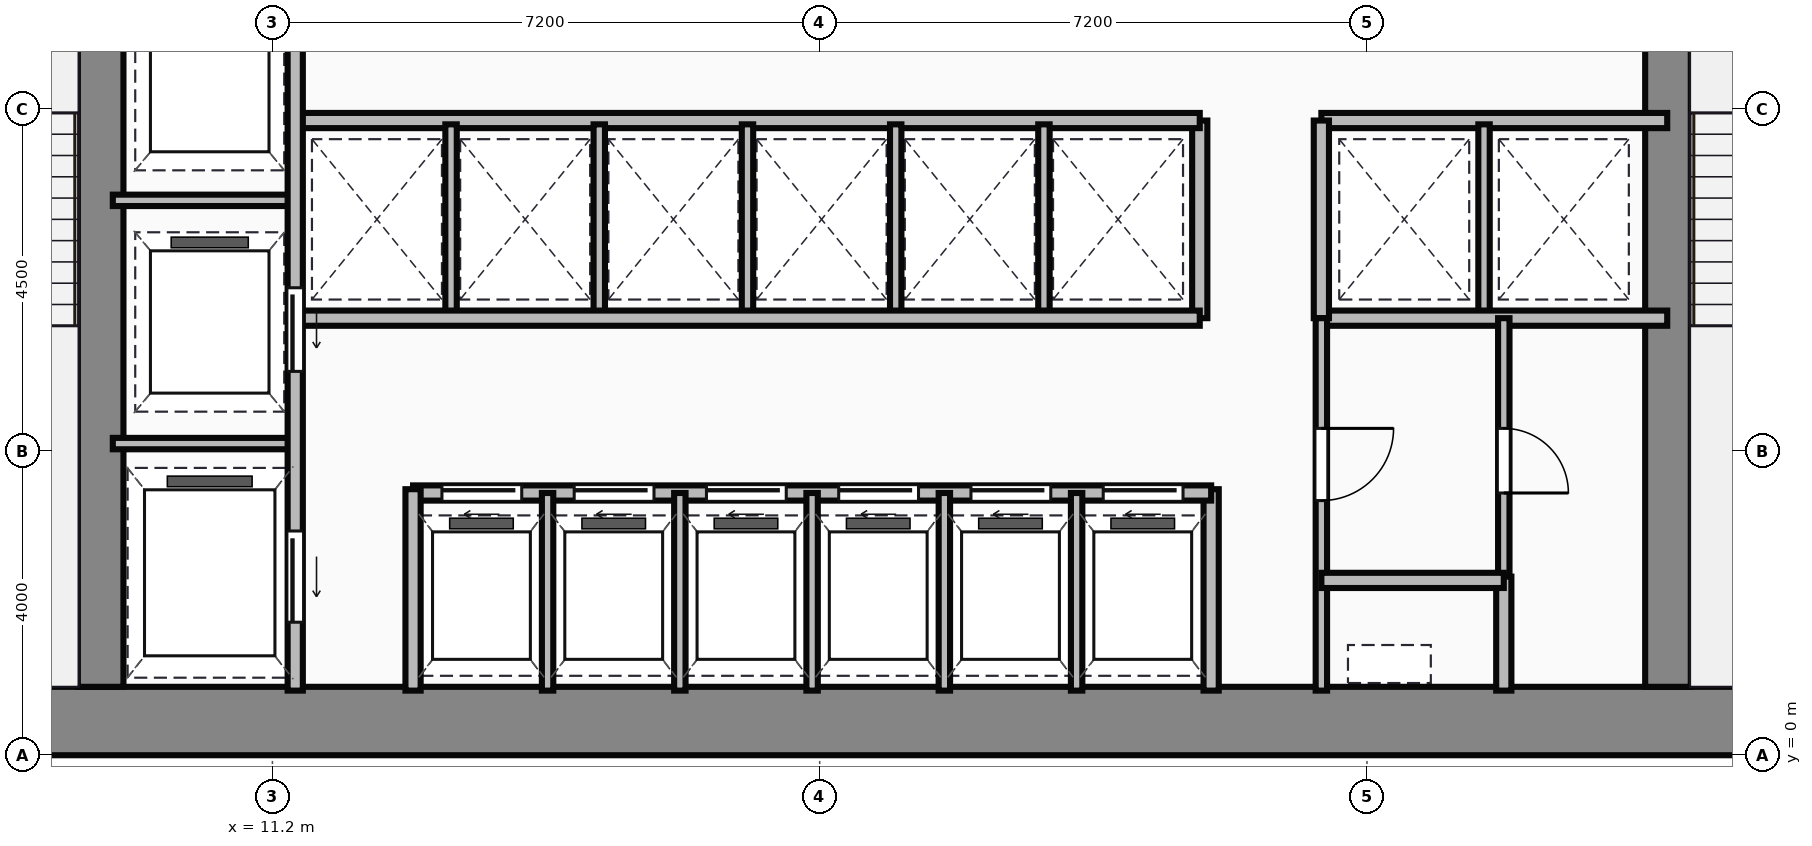
"""IFC4 building model, lengths in metres.
Left out: names, types, materials, properties, quantities, classifications, styles, units other than length and angle.
Written with IfcOpenShell. Run it as: python <this file> out.ifc"""

import sys

from ifc_helpers import new_model, si_unit, direction, frame, frame_2d, origin, place, context, subcontext, project, spatial, rectangle, extrude, source, transform, mapped, element, fill, save


model = new_model("IFC4")
c1 = context("Model", 3, precision=1e-05, world=origin(), true_north=direction((0.0, 1.0)))
c2 = subcontext(c1, "Body", "Model", "MODEL_VIEW")
j1 = project(units=[si_unit("LENGTHUNIT", "METRE"), si_unit("PLANEANGLEUNIT", "RADIAN")], contexts=[c1])
p1 = place(None, origin())
s1 = spatial("IfcSite", under=j1, at=p1, CompositionType="ELEMENT")
p2 = place(p1, origin())
s2 = spatial("IfcBuilding", under=s1, at=p2, CompositionType="ELEMENT")
p3 = place(p2, frame((0.0, 0.0, 65.35)))
s3 = spatial("IfcBuildingStorey", under=s2, at=p3, CompositionType="ELEMENT", Elevation=65.35)
m1 = source(origin(), c2, "Body", "SweptSolid", [
    extrude(rectangle(XDim=29.5, YDim=0.9, at=frame_2d((14.75, 0.0))), origin(), (0.0, 0.0, 1.0), 3.65),
])
p4 = place(p3, frame((4.5, 0.45, 0.0), z_axis=(0.0, 0.0, 1.0), x_axis=(1.0, 0.0, 0.0)))
e1 = element("IfcWall", 1, at=p4, inside=s3, PredefinedType="SHEAR", context=c2, shape_type="MappedRepresentation", body=[
    mapped(m1, transform((0.0, 0.0, 0.0))),
])
m2 = source(origin(), c2, "Body", "SweptSolid", [
    extrude(rectangle(XDim=12.2, YDim=0.6, at=frame_2d((6.1, 0.0))), origin(), (0.0, 0.0, 1.0), 3.65),
])
for number, where, z_axis, x_axis in (
    (2, (8.94, 0.9, 0.0), (0.0, 0.0, 1.0), (0.0, 1.0, 0.0)),
    (3, (29.56, 0.9, 0.0), (0.0, 0.0, 1.0), (0.0, 1.0, 0.0)),
):
    element("IfcWall", number, at=place(p3, frame(where, z_axis=z_axis, x_axis=x_axis)), inside=s3, PredefinedType="SHEAR", context=c2, shape_type="MappedRepresentation", body=[
        mapped(m2, transform((0.0, 0.0, 0.0))),
    ])
m3 = source(origin(), c2, "Body", "SweptSolid", [
    extrude(rectangle(XDim=9.6, YDim=0.2, at=frame_2d((4.8, 0.0))), origin(), (0.0, 0.0, 1.0), 3.4),
])
p5 = place(p3, frame((11.5, 0.85, 0.0), z_axis=(0.0, 0.0, 1.0), x_axis=(0.0, 1.0, 0.0)))
e4 = element("IfcWall", 4, at=p5, inside=s3, PredefinedType="PARTITIONING", context=c2, shape_type="MappedRepresentation", body=[
    mapped(m3, transform((0.0, 0.0, 0.0))),
])
p6 = place(p5, frame((4.2, 0.0, 0.0)))
e5 = element("IfcOpeningElement", 5, at=p6, cuts=e4, PredefinedType="OPENING", context=c2, shape_type="SweptSolid", body=[
    extrude(rectangle(XDim=1.1, YDim=2.15, at=frame_2d((0.55, 1.075))), frame((0.0, 0.11, 0.0), z_axis=(0.0, -1.0, 0.0), x_axis=(1.0, 0.0, 0.0)), (0.0, 0.0, 1.0), 0.22),
])
p7 = place(p5, frame((0.9, 0.0, 0.0)))
e6 = element("IfcOpeningElement", 6, at=p7, cuts=e4, PredefinedType="OPENING", context=c2, shape_type="SweptSolid", body=[
    extrude(rectangle(XDim=1.2, YDim=2.15, at=frame_2d((0.6, 1.075))), frame((0.0, 0.11, 0.0), z_axis=(0.0, -1.0, 0.0), x_axis=(1.0, 0.0, 0.0)), (0.0, 0.0, 1.0), 0.22),
])
m4 = source(origin(), c2, "Body", "SweptSolid", [
    extrude(rectangle(XDim=2.4, YDim=0.15, at=frame_2d((1.2, 0.0))), origin(), (0.0, 0.0, 1.0), 3.4),
])
for number, where, z_axis, x_axis in (
    (7, (9.1, 4.1, 0.0), (0.0, 0.0, 1.0), (1.0, 0.0, 0.0)),
    (8, (9.1, 7.3, 0.0), (0.0, 0.0, 1.0), (1.0, 0.0, 0.0)),
):
    element("IfcWall", number, at=place(p3, frame(where, z_axis=z_axis, x_axis=x_axis)), inside=s3, PredefinedType="PARTITIONING", context=c2, shape_type="MappedRepresentation", body=[
        mapped(m4, transform((0.0, 0.0, 0.0))),
    ])
m5 = source(origin(), c2, "Body", "SweptSolid", [
    extrude(rectangle(XDim=2.65, YDim=0.2, at=frame_2d((1.325, 0.0))), origin(), (0.0, 0.0, 1.0), 3.4),
])
p8 = place(p3, frame((13.05, 0.85, 0.0), z_axis=(0.0, 0.0, 1.0), x_axis=(0.0, 1.0, 0.0)))
e9 = element("IfcWall", 9, at=p8, inside=s3, PredefinedType="PARTITIONING", context=c2, shape_type="MappedRepresentation", body=[
    mapped(m5, transform((0.0, 0.0, 0.0))),
])
m6 = source(origin(), c2, "Body", "SweptSolid", [
    extrude(rectangle(XDim=10.5, YDim=0.2, at=frame_2d((5.25, 0.0))), origin(), (0.0, 0.0, 1.0), 3.4),
])
p9 = place(p3, frame((13.05, 3.45, 0.0), z_axis=(0.0, 0.0, 1.0), x_axis=(1.0, 0.0, 0.0)))
e10 = element("IfcWall", 10, at=p9, inside=s3, PredefinedType="PARTITIONING", context=c2, shape_type="MappedRepresentation", body=[
    mapped(m6, transform((0.0, 0.0, 0.0))),
])
p10 = place(p9, frame((0.38, 0.0, 0.0)))
e11 = element("IfcOpeningElement", 11, at=p10, cuts=e10, PredefinedType="OPENING", context=c2, shape_type="SweptSolid", body=[
    extrude(rectangle(XDim=1.05, YDim=2.15, at=frame_2d((0.525, 1.075))), frame((0.0, 0.11, 0.0), z_axis=(0.0, -1.0, 0.0), x_axis=(1.0, 0.0, 0.0)), (0.0, 0.0, 1.0), 0.22),
])
p11 = place(p9, frame((2.12, 0.0, 0.0)))
e12 = element("IfcOpeningElement", 12, at=p11, cuts=e10, PredefinedType="OPENING", context=c2, shape_type="SweptSolid", body=[
    extrude(rectangle(XDim=1.05, YDim=2.15, at=frame_2d((0.525, 1.075))), frame((0.0, 0.11, 0.0), z_axis=(0.0, -1.0, 0.0), x_axis=(1.0, 0.0, 0.0)), (0.0, 0.0, 1.0), 0.22),
])
p12 = place(p9, frame((3.86, 0.0, 0.0)))
e13 = element("IfcOpeningElement", 13, at=p12, cuts=e10, PredefinedType="OPENING", context=c2, shape_type="SweptSolid", body=[
    extrude(rectangle(XDim=1.05, YDim=2.15, at=frame_2d((0.525, 1.075))), frame((0.0, 0.11, 0.0), z_axis=(0.0, -1.0, 0.0), x_axis=(1.0, 0.0, 0.0)), (0.0, 0.0, 1.0), 0.22),
])
p13 = place(p9, frame((5.6, 0.0, 0.0)))
e14 = element("IfcOpeningElement", 14, at=p13, cuts=e10, PredefinedType="OPENING", context=c2, shape_type="SweptSolid", body=[
    extrude(rectangle(XDim=1.05, YDim=2.15, at=frame_2d((0.525, 1.075))), frame((0.0, 0.11, 0.0), z_axis=(0.0, -1.0, 0.0), x_axis=(1.0, 0.0, 0.0)), (0.0, 0.0, 1.0), 0.22),
])
p14 = place(p9, frame((7.34, 0.0, 0.0)))
e15 = element("IfcOpeningElement", 15, at=p14, cuts=e10, PredefinedType="OPENING", context=c2, shape_type="SweptSolid", body=[
    extrude(rectangle(XDim=1.05, YDim=2.15, at=frame_2d((0.525, 1.075))), frame((0.0, 0.11, 0.0), z_axis=(0.0, -1.0, 0.0), x_axis=(1.0, 0.0, 0.0)), (0.0, 0.0, 1.0), 0.22),
])
p15 = place(p9, frame((9.08, 0.0, 0.0)))
e16 = element("IfcOpeningElement", 16, at=p15, cuts=e10, PredefinedType="OPENING", context=c2, shape_type="SweptSolid", body=[
    extrude(rectangle(XDim=1.05, YDim=2.15, at=frame_2d((0.525, 1.075))), frame((0.0, 0.11, 0.0), z_axis=(0.0, -1.0, 0.0), x_axis=(1.0, 0.0, 0.0)), (0.0, 0.0, 1.0), 0.22),
])
p16 = place(p3, frame((23.55, 0.85, 0.0), z_axis=(0.0, 0.0, 1.0), x_axis=(0.0, 1.0, 0.0)))
e17 = element("IfcWall", 17, at=p16, inside=s3, PredefinedType="PARTITIONING", context=c2, shape_type="MappedRepresentation", body=[
    mapped(m5, transform((0.0, 0.0, 0.0))),
])
m7 = source(origin(), c2, "Body", "SweptSolid", [
    extrude(rectangle(XDim=2.6, YDim=0.15, at=frame_2d((1.3, 0.0))), origin(), (0.0, 0.0, 1.0), 3.4),
])
for number, where, z_axis, x_axis in (
    (18, (14.82, 0.85, 0.0), (0.0, 0.0, 1.0), (0.0, 1.0, 0.0)),
    (19, (16.56, 0.85, 0.0), (0.0, 0.0, 1.0), (0.0, 1.0, 0.0)),
    (20, (18.3, 0.85, 0.0), (0.0, 0.0, 1.0), (0.0, 1.0, 0.0)),
    (21, (20.04, 0.85, 0.0), (0.0, 0.0, 1.0), (0.0, 1.0, 0.0)),
    (22, (21.78, 0.85, 0.0), (0.0, 0.0, 1.0), (0.0, 1.0, 0.0)),
):
    element("IfcWall", number, at=place(p3, frame(where, z_axis=z_axis, x_axis=x_axis)), inside=s3, PredefinedType="PARTITIONING", context=c2, shape_type="MappedRepresentation", body=[
        mapped(m7, transform((0.0, 0.0, 0.0))),
    ])
m8 = source(origin(), c2, "Body", "SweptSolid", [
    extrude(rectangle(XDim=11.85, YDim=0.2, at=frame_2d((5.925, 0.0))), origin(), (0.0, 0.0, 1.0), 3.4),
])
for number, where, z_axis, x_axis in (
    (23, (11.55, 5.75, 0.0), (0.0, 0.0, 1.0), (1.0, 0.0, 0.0)),
    (24, (11.55, 8.35, 0.0), (0.0, 0.0, 1.0), (1.0, 0.0, 0.0)),
):
    element("IfcWall", number, at=place(p3, frame(where, z_axis=z_axis, x_axis=x_axis)), inside=s3, PredefinedType="PARTITIONING", context=c2, shape_type="MappedRepresentation", body=[
        mapped(m8, transform((0.0, 0.0, 0.0))),
    ])
m9 = source(origin(), c2, "Body", "SweptSolid", [
    extrude(rectangle(XDim=2.6, YDim=0.2, at=frame_2d((1.3, 0.0))), origin(), (0.0, 0.0, 1.0), 3.4),
])
p17 = place(p3, frame((23.4, 5.75, 0.0), z_axis=(0.0, 0.0, 1.0), x_axis=(0.0, 1.0, 0.0)))
e25 = element("IfcWall", 25, at=p17, inside=s3, PredefinedType="PARTITIONING", context=c2, shape_type="MappedRepresentation", body=[
    mapped(m9, transform((0.0, 0.0, 0.0))),
])
m10 = source(origin(), c2, "Body", "SweptSolid", [
    extrude(rectangle(XDim=2.5, YDim=0.15, at=frame_2d((1.25, 0.0))), origin(), (0.0, 0.0, 1.0), 3.4),
])
for number, where, z_axis, x_axis in (
    (26, (13.55, 5.8, 0.0), (0.0, 0.0, 1.0), (0.0, 1.0, 0.0)),
    (27, (15.5, 5.8, 0.0), (0.0, 0.0, 1.0), (0.0, 1.0, 0.0)),
    (28, (17.45, 5.8, 0.0), (0.0, 0.0, 1.0), (0.0, 1.0, 0.0)),
    (29, (19.4, 5.8, 0.0), (0.0, 0.0, 1.0), (0.0, 1.0, 0.0)),
    (30, (21.35, 5.8, 0.0), (0.0, 0.0, 1.0), (0.0, 1.0, 0.0)),
):
    element("IfcWall", number, at=place(p3, frame(where, z_axis=z_axis, x_axis=x_axis)), inside=s3, PredefinedType="PARTITIONING", context=c2, shape_type="MappedRepresentation", body=[
        mapped(m10, transform((0.0, 0.0, 0.0))),
    ])
m11 = source(origin(), c2, "Body", "SweptSolid", [
    extrude(rectangle(XDim=4.55, YDim=0.2, at=frame_2d((2.275, 0.0))), origin(), (0.0, 0.0, 1.0), 3.4),
])
for number, where, z_axis, x_axis in (
    (31, (25.0, 8.35, 0.0), (0.0, 0.0, 1.0), (1.0, 0.0, 0.0)),
    (32, (25.0, 5.75, 0.0), (0.0, 0.0, 1.0), (1.0, 0.0, 0.0)),
):
    element("IfcWall", number, at=place(p3, frame(where, z_axis=z_axis, x_axis=x_axis)), inside=s3, PredefinedType="PARTITIONING", context=c2, shape_type="MappedRepresentation", body=[
        mapped(m11, transform((0.0, 0.0, 0.0))),
    ])
p18 = place(p3, frame((25.0, 5.75, 0.0), z_axis=(0.0, 0.0, 1.0), x_axis=(0.0, 1.0, 0.0)))
e33 = element("IfcWall", 33, at=p18, inside=s3, PredefinedType="PARTITIONING", context=c2, shape_type="MappedRepresentation", body=[
    mapped(m9, transform((0.0, 0.0, 0.0))),
])
p19 = place(p3, frame((27.14, 5.8, 0.0), z_axis=(0.0, 0.0, 1.0), x_axis=(0.0, 1.0, 0.0)))
e34 = element("IfcWall", 34, at=p19, inside=s3, PredefinedType="PARTITIONING", context=c2, shape_type="MappedRepresentation", body=[
    mapped(m10, transform((0.0, 0.0, 0.0))),
])
m12 = source(origin(), c2, "Body", "SweptSolid", [
    extrude(rectangle(XDim=4.9, YDim=0.15, at=frame_2d((2.45, 0.0))), origin(), (0.0, 0.0, 1.0), 3.4),
])
p20 = place(p3, frame((25.0, 0.85, 0.0), z_axis=(0.0, 0.0, 1.0), x_axis=(0.0, 1.0, 0.0)))
e35 = element("IfcWall", 35, at=p20, inside=s3, PredefinedType="PARTITIONING", context=c2, shape_type="MappedRepresentation", body=[
    mapped(m12, transform((0.0, 0.0, 0.0))),
])
p21 = place(p20, frame((2.5, 0.0, 0.0)))
e36 = element("IfcOpeningElement", 36, at=p21, cuts=e35, PredefinedType="OPENING", context=c2, shape_type="SweptSolid", body=[
    extrude(rectangle(XDim=0.95, YDim=2.15, at=frame_2d((0.475, 1.075))), frame((0.0, 0.085, 0.0), z_axis=(0.0, -1.0, 0.0), x_axis=(1.0, 0.0, 0.0)), (0.0, 0.0, 1.0), 0.17),
])
m13 = source(origin(), c2, "Body", "SweptSolid", [
    extrude(rectangle(XDim=2.4, YDim=0.2, at=frame_2d((1.2, 0.0))), origin(), (0.0, 0.0, 1.0), 3.4),
])
p22 = place(p3, frame((25.0, 2.3, 0.0), z_axis=(0.0, 0.0, 1.0), x_axis=(1.0, 0.0, 0.0)))
e37 = element("IfcWall", 37, at=p22, inside=s3, PredefinedType="PARTITIONING", context=c2, shape_type="MappedRepresentation", body=[
    mapped(m13, transform((0.0, 0.0, 0.0))),
])
m14 = source(origin(), c2, "Body", "SweptSolid", [
    extrude(rectangle(XDim=1.5, YDim=0.2, at=frame_2d((0.75, 0.0))), origin(), (0.0, 0.0, 1.0), 3.4),
])
p23 = place(p3, frame((27.4, 0.85, 0.0), z_axis=(0.0, 0.0, 1.0), x_axis=(0.0, 1.0, 0.0)))
e38 = element("IfcWall", 38, at=p23, inside=s3, PredefinedType="PARTITIONING", context=c2, shape_type="MappedRepresentation", body=[
    mapped(m14, transform((0.0, 0.0, 0.0))),
])
m15 = source(origin(), c2, "Body", "SweptSolid", [
    extrude(rectangle(XDim=3.4, YDim=0.15, at=frame_2d((1.7, 0.0))), origin(), (0.0, 0.0, 1.0), 3.4),
])
p24 = place(p3, frame((27.4, 2.35, 0.0), z_axis=(0.0, 0.0, 1.0), x_axis=(0.0, 1.0, 0.0)))
e39 = element("IfcWall", 39, at=p24, inside=s3, PredefinedType="PARTITIONING", context=c2, shape_type="MappedRepresentation", body=[
    mapped(m15, transform((0.0, 0.0, 0.0))),
])
p25 = place(p24, frame((1.1, 0.0, 0.0)))
e40 = element("IfcOpeningElement", 40, at=p25, cuts=e39, PredefinedType="OPENING", context=c2, shape_type="SweptSolid", body=[
    extrude(rectangle(XDim=0.85, YDim=2.1, at=frame_2d((0.425, 1.05))), frame((0.0, 0.085, 0.0), z_axis=(0.0, -1.0, 0.0), x_axis=(1.0, 0.0, 0.0)), (0.0, 0.0, 1.0), 0.17),
])
m16 = source(origin(), c2, "Body", "SweptSolid", [
    extrude(rectangle(XDim=1.1, YDim=2.15, at=frame_2d((0.55, 1.075))), frame((0.0, 0.025, 0.0), z_axis=(0.0, -1.0, 0.0), x_axis=(1.0, 0.0, 0.0)), (0.0, 0.0, 1.0), 0.05),
])
p26 = place(p6, frame((1.1, 0.0, 0.0), z_axis=(0.0, 0.0, 1.0), x_axis=(-1.0, 0.0, 0.0)))
e41 = element("IfcDoor", 41, at=p26, inside=s3, OperationType="SLIDING_TO_LEFT", PredefinedType="DOOR", context=c2, shape_type="MappedRepresentation", body=[
    mapped(m16, transform((0.0, 0.0, 0.0))),
])
fill(e5, e41)
m17 = source(origin(), c2, "Body", "SweptSolid", [
    extrude(rectangle(XDim=1.2, YDim=2.15, at=frame_2d((0.6, 1.075))), frame((0.0, 0.025, 0.0), z_axis=(0.0, -1.0, 0.0), x_axis=(1.0, 0.0, 0.0)), (0.0, 0.0, 1.0), 0.05),
])
p27 = place(p7, frame((1.2, 0.0, 0.0), z_axis=(0.0, 0.0, 1.0), x_axis=(-1.0, 0.0, 0.0)))
e42 = element("IfcDoor", 42, at=p27, inside=s3, OperationType="SLIDING_TO_LEFT", PredefinedType="DOOR", context=c2, shape_type="MappedRepresentation", body=[
    mapped(m17, transform((0.0, 0.0, 0.0))),
])
fill(e6, e42)
m18 = source(origin(), c2, "Body", "SweptSolid", [
    extrude(rectangle(XDim=1.05, YDim=2.15, at=frame_2d((0.525, 1.075))), frame((0.0, 0.025, 0.0), z_axis=(0.0, -1.0, 0.0), x_axis=(1.0, 0.0, 0.0)), (0.0, 0.0, 1.0), 0.05),
])
p28 = place(p10, origin())
e43 = element("IfcDoor", 43, at=p28, inside=s3, OperationType="SLIDING_TO_LEFT", PredefinedType="DOOR", context=c2, shape_type="MappedRepresentation", body=[
    mapped(m18, transform((0.0, 0.0, 0.0))),
])
fill(e11, e43)
p29 = place(p11, origin())
e44 = element("IfcDoor", 44, at=p29, inside=s3, OperationType="SLIDING_TO_LEFT", PredefinedType="DOOR", context=c2, shape_type="MappedRepresentation", body=[
    mapped(m18, transform((0.0, 0.0, 0.0))),
])
fill(e12, e44)
p30 = place(p12, origin())
e45 = element("IfcDoor", 45, at=p30, inside=s3, OperationType="SLIDING_TO_LEFT", PredefinedType="DOOR", context=c2, shape_type="MappedRepresentation", body=[
    mapped(m18, transform((0.0, 0.0, 0.0))),
])
fill(e13, e45)
p31 = place(p13, origin())
e46 = element("IfcDoor", 46, at=p31, inside=s3, OperationType="SLIDING_TO_LEFT", PredefinedType="DOOR", context=c2, shape_type="MappedRepresentation", body=[
    mapped(m18, transform((0.0, 0.0, 0.0))),
])
fill(e14, e46)
p32 = place(p14, origin())
e47 = element("IfcDoor", 47, at=p32, inside=s3, OperationType="SLIDING_TO_LEFT", PredefinedType="DOOR", context=c2, shape_type="MappedRepresentation", body=[
    mapped(m18, transform((0.0, 0.0, 0.0))),
])
fill(e15, e47)
p33 = place(p15, origin())
e48 = element("IfcDoor", 48, at=p33, inside=s3, OperationType="SLIDING_TO_LEFT", PredefinedType="DOOR", context=c2, shape_type="MappedRepresentation", body=[
    mapped(m18, transform((0.0, 0.0, 0.0))),
])
fill(e16, e48)
m19 = source(origin(), c2, "Body", "SweptSolid", [
    extrude(rectangle(XDim=0.95, YDim=2.15, at=frame_2d((0.475, 1.075))), frame((0.0, 0.025, 0.0), z_axis=(0.0, -1.0, 0.0), x_axis=(1.0, 0.0, 0.0)), (0.0, 0.0, 1.0), 0.05),
])
p34 = place(p21, origin())
e49 = element("IfcDoor", 49, at=p34, inside=s3, OperationType="SINGLE_SWING_RIGHT", PredefinedType="DOOR", context=c2, shape_type="MappedRepresentation", body=[
    mapped(m19, transform((0.0, 0.0, 0.0))),
])
fill(e36, e49)
m20 = source(origin(), c2, "Body", "SweptSolid", [
    extrude(rectangle(XDim=0.85, YDim=2.1, at=frame_2d((0.425, 1.05))), frame((0.0, 0.025, 0.0), z_axis=(0.0, -1.0, 0.0), x_axis=(1.0, 0.0, 0.0)), (0.0, 0.0, 1.0), 0.05),
])
p35 = place(p25, frame((0.85, 0.0, 0.0), z_axis=(0.0, 0.0, 1.0), x_axis=(-1.0, 0.0, 0.0)))
e50 = element("IfcDoor", 50, at=p35, inside=s3, OperationType="SINGLE_SWING_LEFT", PredefinedType="DOOR", context=c2, shape_type="MappedRepresentation", body=[
    mapped(m20, transform((0.0, 0.0, 0.0))),
])
fill(e40, e50)
save(model, sys.argv[1])
